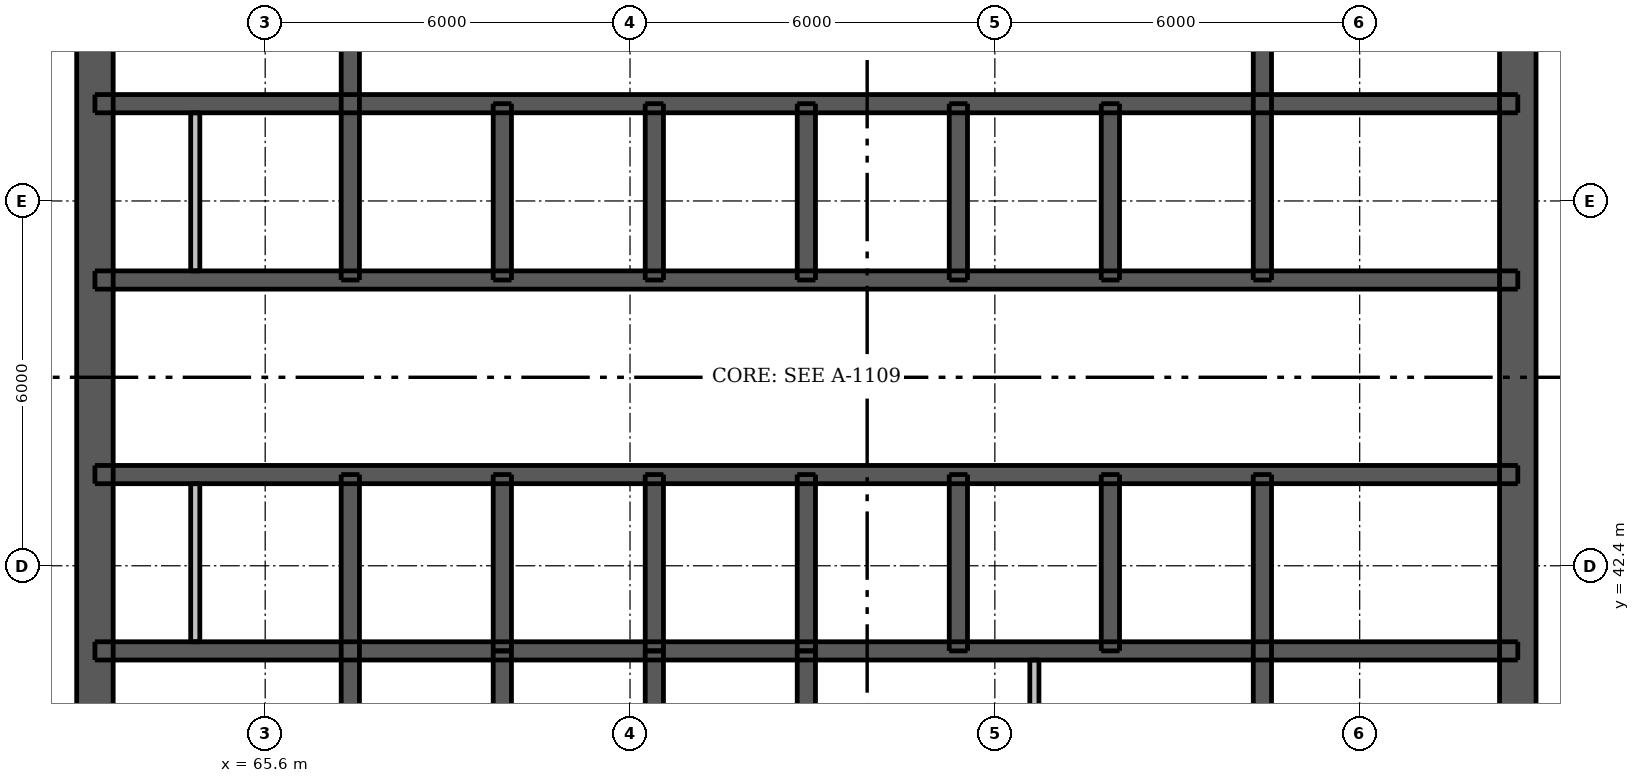
"""IFC4 building model, lengths in metres.
Left out: names, types, materials, properties, quantities, classifications, styles, units other than length and angle.
Written with IfcOpenShell. Run it as: python <this file> out.ifc"""

import sys

from ifc_helpers import new_model, si_unit, direction, frame, frame_2d, origin, place, context, subcontext, project, spatial, rectangle, extrude, element, fill, save


model = new_model("IFC4")
c1 = context("Model", 3, precision=1e-05, world=origin(), true_north=direction((0.0, 1.0)))
c2 = subcontext(c1, "Body", "Model", "MODEL_VIEW")
j1 = project(units=[si_unit("LENGTHUNIT", "METRE"), si_unit("PLANEANGLEUNIT", "RADIAN")], contexts=[c1])
p1 = place(None, origin())
s1 = spatial("IfcSite", under=j1, at=p1, CompositionType="ELEMENT")
p2 = place(p1, origin())
s2 = spatial("IfcBuilding", under=s1, at=p2, CompositionType="ELEMENT")
p3 = place(p2, frame((0.0, 0.0, 193.6)))
s3 = spatial("IfcBuildingStorey", under=s2, at=p3, CompositionType="ELEMENT", Elevation=193.6)
p4 = place(p3, frame((62.8, 33.5, 0.0), z_axis=(0.0, 0.0, 1.0), x_axis=(0.0, 1.0, 0.0)))
e1 = element("IfcWall", 1, at=p4, inside=s3, PredefinedType="SHEAR", context=c2, shape_type="SweptSolid", body=[
    extrude(rectangle(XDim=24.0, YDim=0.6, at=frame_2d((12.0, 0.0))), origin(), (0.0, 0.0, 1.0), 3.05),
])
p5 = place(p4, frame((11.2, 0.0, 0.0)))
e2 = element("IfcOpeningElement", 2, at=p5, cuts=e1, PredefinedType="OPENING", context=c2, shape_type="SweptSolid", body=[
    extrude(rectangle(XDim=1.6, YDim=2.1, at=frame_2d((0.8, 1.05))), frame((0.0, 0.31, 0.0), z_axis=(0.0, -1.0, 0.0), x_axis=(1.0, 0.0, 0.0)), (0.0, 0.0, 1.0), 0.62),
])
p6 = place(p3, frame((86.2, 33.5, 0.0), z_axis=(0.0, 0.0, 1.0), x_axis=(0.0, 1.0, 0.0)))
e3 = element("IfcWall", 3, at=p6, inside=s3, PredefinedType="SHEAR", context=c2, shape_type="SweptSolid", body=[
    extrude(rectangle(XDim=24.0, YDim=0.6, at=frame_2d((12.0, 0.0))), origin(), (0.0, 0.0, 1.0), 3.05),
])
p7 = place(p6, frame((11.2, 0.0, 0.0)))
e4 = element("IfcOpeningElement", 4, at=p7, cuts=e3, PredefinedType="OPENING", context=c2, shape_type="SweptSolid", body=[
    extrude(rectangle(XDim=1.6, YDim=2.1, at=frame_2d((0.8, 1.05))), frame((0.0, 0.31, 0.0), z_axis=(0.0, -1.0, 0.0), x_axis=(1.0, 0.0, 0.0)), (0.0, 0.0, 1.0), 0.62),
])
p8 = place(p3, frame((62.8, 41.0, 0.0), z_axis=(0.0, 0.0, 1.0), x_axis=(1.0, 0.0, 0.0)))
e5 = element("IfcWall", 5, at=p8, inside=s3, PredefinedType="SHEAR", context=c2, shape_type="SweptSolid", body=[
    extrude(rectangle(XDim=23.4, YDim=0.3, at=frame_2d((11.7, 0.0))), origin(), (0.0, 0.0, 1.0), 3.05),
])
p9 = place(p3, frame((62.8, 43.9, 0.0), z_axis=(0.0, 0.0, 1.0), x_axis=(1.0, 0.0, 0.0)))
e6 = element("IfcWall", 6, at=p9, inside=s3, PredefinedType="SHEAR", context=c2, shape_type="SweptSolid", body=[
    extrude(rectangle(XDim=23.4, YDim=0.3, at=frame_2d((11.7, 0.0))), origin(), (0.0, 0.0, 1.0), 3.05),
])
p10 = place(p9, frame((0.575, 0.0, 0.0)))
e7 = element("IfcOpeningElement", 7, at=p10, cuts=e6, PredefinedType="OPENING", context=c2, shape_type="SweptSolid", body=[
    extrude(rectangle(XDim=0.8, YDim=2.1, at=frame_2d((0.4, 1.05))), frame((0.0, 0.16, 0.0), z_axis=(0.0, -1.0, 0.0), x_axis=(1.0, 0.0, 0.0)), (0.0, 0.0, 1.0), 0.32),
])
p11 = place(p9, frame((2.4, 0.0, 0.0)))
e8 = element("IfcOpeningElement", 8, at=p11, cuts=e6, PredefinedType="OPENING", context=c2, shape_type="SweptSolid", body=[
    extrude(rectangle(XDim=0.9, YDim=2.1, at=frame_2d((0.45, 1.05))), frame((0.0, 0.16, 0.0), z_axis=(0.0, -1.0, 0.0), x_axis=(1.0, 0.0, 0.0)), (0.0, 0.0, 1.0), 0.32),
])
p12 = place(p9, frame((20.775, 0.0, 0.0)))
e9 = element("IfcOpeningElement", 9, at=p12, cuts=e6, PredefinedType="OPENING", context=c2, shape_type="SweptSolid", body=[
    extrude(rectangle(XDim=0.9, YDim=2.1, at=frame_2d((0.45, 1.05))), frame((0.0, 0.16, 0.0), z_axis=(0.0, -1.0, 0.0), x_axis=(1.0, 0.0, 0.0)), (0.0, 0.0, 1.0), 0.32),
])
p13 = place(p9, frame((7.5, 0.0, 0.0)))
e10 = element("IfcOpeningElement", 10, at=p13, cuts=e6, PredefinedType="OPENING", context=c2, shape_type="SweptSolid", body=[
    extrude(rectangle(XDim=0.9, YDim=2.1, at=frame_2d((0.45, 1.05))), frame((0.0, 0.16, 0.0), z_axis=(0.0, -1.0, 0.0), x_axis=(1.0, 0.0, 0.0)), (0.0, 0.0, 1.0), 0.32),
])
p14 = place(p9, frame((10.0, 0.0, 0.0)))
e11 = element("IfcOpeningElement", 11, at=p14, cuts=e6, PredefinedType="OPENING", context=c2, shape_type="SweptSolid", body=[
    extrude(rectangle(XDim=0.9, YDim=2.1, at=frame_2d((0.45, 1.05))), frame((0.0, 0.16, 0.0), z_axis=(0.0, -1.0, 0.0), x_axis=(1.0, 0.0, 0.0)), (0.0, 0.0, 1.0), 0.32),
])
p15 = place(p9, frame((15.0, 0.0, 0.0)))
e12 = element("IfcOpeningElement", 12, at=p15, cuts=e6, PredefinedType="OPENING", context=c2, shape_type="SweptSolid", body=[
    extrude(rectangle(XDim=0.9, YDim=2.1, at=frame_2d((0.45, 1.05))), frame((0.0, 0.16, 0.0), z_axis=(0.0, -1.0, 0.0), x_axis=(1.0, 0.0, 0.0)), (0.0, 0.0, 1.0), 0.32),
])
p16 = place(p9, frame((17.5, 0.0, 0.0)))
e13 = element("IfcOpeningElement", 13, at=p16, cuts=e6, PredefinedType="OPENING", context=c2, shape_type="SweptSolid", body=[
    extrude(rectangle(XDim=0.9, YDim=2.1, at=frame_2d((0.45, 1.05))), frame((0.0, 0.16, 0.0), z_axis=(0.0, -1.0, 0.0), x_axis=(1.0, 0.0, 0.0)), (0.0, 0.0, 1.0), 0.32),
])
p17 = place(p3, frame((62.8, 47.1, 0.0), z_axis=(0.0, 0.0, 1.0), x_axis=(1.0, 0.0, 0.0)))
e14 = element("IfcWall", 14, at=p17, inside=s3, PredefinedType="SHEAR", context=c2, shape_type="SweptSolid", body=[
    extrude(rectangle(XDim=23.4, YDim=0.3, at=frame_2d((11.7, 0.0))), origin(), (0.0, 0.0, 1.0), 3.05),
])
p18 = place(p17, frame((0.575, 0.0, 0.0)))
e15 = element("IfcOpeningElement", 15, at=p18, cuts=e14, PredefinedType="OPENING", context=c2, shape_type="SweptSolid", body=[
    extrude(rectangle(XDim=0.8, YDim=2.1, at=frame_2d((0.4, 1.05))), frame((0.0, 0.16, 0.0), z_axis=(0.0, -1.0, 0.0), x_axis=(1.0, 0.0, 0.0)), (0.0, 0.0, 1.0), 0.32),
])
p19 = place(p17, frame((2.4, 0.0, 0.0)))
e16 = element("IfcOpeningElement", 16, at=p19, cuts=e14, PredefinedType="OPENING", context=c2, shape_type="SweptSolid", body=[
    extrude(rectangle(XDim=0.9, YDim=2.1, at=frame_2d((0.45, 1.05))), frame((0.0, 0.16, 0.0), z_axis=(0.0, -1.0, 0.0), x_axis=(1.0, 0.0, 0.0)), (0.0, 0.0, 1.0), 0.32),
])
p20 = place(p17, frame((20.775, 0.0, 0.0)))
e17 = element("IfcOpeningElement", 17, at=p20, cuts=e14, PredefinedType="OPENING", context=c2, shape_type="SweptSolid", body=[
    extrude(rectangle(XDim=0.9, YDim=2.1, at=frame_2d((0.45, 1.05))), frame((0.0, 0.16, 0.0), z_axis=(0.0, -1.0, 0.0), x_axis=(1.0, 0.0, 0.0)), (0.0, 0.0, 1.0), 0.32),
])
p21 = place(p17, frame((4.9, 0.0, 0.0)))
e18 = element("IfcOpeningElement", 18, at=p21, cuts=e14, PredefinedType="OPENING", context=c2, shape_type="SweptSolid", body=[
    extrude(rectangle(XDim=1.1, YDim=2.1, at=frame_2d((0.55, 1.05))), frame((0.0, 0.16, 0.0), z_axis=(0.0, -1.0, 0.0), x_axis=(1.0, 0.0, 0.0)), (0.0, 0.0, 1.0), 0.32),
])
p22 = place(p17, frame((7.4, 0.0, 0.0)))
e19 = element("IfcOpeningElement", 19, at=p22, cuts=e14, PredefinedType="OPENING", context=c2, shape_type="SweptSolid", body=[
    extrude(rectangle(XDim=1.1, YDim=2.1, at=frame_2d((0.55, 1.05))), frame((0.0, 0.16, 0.0), z_axis=(0.0, -1.0, 0.0), x_axis=(1.0, 0.0, 0.0)), (0.0, 0.0, 1.0), 0.32),
])
p23 = place(p17, frame((9.9, 0.0, 0.0)))
e20 = element("IfcOpeningElement", 20, at=p23, cuts=e14, PredefinedType="OPENING", context=c2, shape_type="SweptSolid", body=[
    extrude(rectangle(XDim=1.1, YDim=2.1, at=frame_2d((0.55, 1.05))), frame((0.0, 0.16, 0.0), z_axis=(0.0, -1.0, 0.0), x_axis=(1.0, 0.0, 0.0)), (0.0, 0.0, 1.0), 0.32),
])
p24 = place(p17, frame((12.4, 0.0, 0.0)))
e21 = element("IfcOpeningElement", 21, at=p24, cuts=e14, PredefinedType="OPENING", context=c2, shape_type="SweptSolid", body=[
    extrude(rectangle(XDim=1.1, YDim=2.1, at=frame_2d((0.55, 1.05))), frame((0.0, 0.16, 0.0), z_axis=(0.0, -1.0, 0.0), x_axis=(1.0, 0.0, 0.0)), (0.0, 0.0, 1.0), 0.32),
])
p25 = place(p17, frame((14.9, 0.0, 0.0)))
e22 = element("IfcOpeningElement", 22, at=p25, cuts=e14, PredefinedType="OPENING", context=c2, shape_type="SweptSolid", body=[
    extrude(rectangle(XDim=1.1, YDim=2.1, at=frame_2d((0.55, 1.05))), frame((0.0, 0.16, 0.0), z_axis=(0.0, -1.0, 0.0), x_axis=(1.0, 0.0, 0.0)), (0.0, 0.0, 1.0), 0.32),
])
p26 = place(p17, frame((17.4, 0.0, 0.0)))
e23 = element("IfcOpeningElement", 23, at=p26, cuts=e14, PredefinedType="OPENING", context=c2, shape_type="SweptSolid", body=[
    extrude(rectangle(XDim=1.1, YDim=2.1, at=frame_2d((0.55, 1.05))), frame((0.0, 0.16, 0.0), z_axis=(0.0, -1.0, 0.0), x_axis=(1.0, 0.0, 0.0)), (0.0, 0.0, 1.0), 0.32),
])
p27 = place(p3, frame((62.8, 50.0, 0.0), z_axis=(0.0, 0.0, 1.0), x_axis=(1.0, 0.0, 0.0)))
e24 = element("IfcWall", 24, at=p27, inside=s3, PredefinedType="SHEAR", context=c2, shape_type="SweptSolid", body=[
    extrude(rectangle(XDim=23.4, YDim=0.3, at=frame_2d((11.7, 0.0))), origin(), (0.0, 0.0, 1.0), 3.05),
])
p28 = place(p3, frame((67.0, 33.8, 0.0), z_axis=(0.0, 0.0, 1.0), x_axis=(0.0, 1.0, 0.0)))
e25 = element("IfcWall", 25, at=p28, inside=s3, PredefinedType="SHEAR", context=c2, shape_type="SweptSolid", body=[
    extrude(rectangle(XDim=10.1, YDim=0.3, at=frame_2d((5.05, 0.0))), origin(), (0.0, 0.0, 1.0), 3.05),
])
p29 = place(p28, frame((0.5, 0.0, 0.0)))
e26 = element("IfcOpeningElement", 26, at=p29, cuts=e25, PredefinedType="OPENING", context=c2, shape_type="SweptSolid", body=[
    extrude(rectangle(XDim=1.1, YDim=2.1, at=frame_2d((0.55, 1.05))), frame((0.0, 0.16, 0.0), z_axis=(0.0, -1.0, 0.0), x_axis=(1.0, 0.0, 0.0)), (0.0, 0.0, 1.0), 0.32),
])
for number, where, z_axis, x_axis in (
    (27, (67.0, 47.1, 0.0), (0.0, 0.0, 1.0), (0.0, 1.0, 0.0)),
    (28, (82.0, 33.8, 0.0), (0.0, 0.0, 1.0), (0.0, 1.0, 0.0)),
    (29, (82.0, 47.1, 0.0), (0.0, 0.0, 1.0), (0.0, 1.0, 0.0)),
):
    element("IfcWall", number, at=place(p3, frame(where, z_axis=z_axis, x_axis=x_axis)), inside=s3, PredefinedType="SHEAR", context=c2, shape_type="SweptSolid", body=[
        extrude(rectangle(XDim=10.1, YDim=0.3, at=frame_2d((5.05, 0.0))), origin(), (0.0, 0.0, 1.0), 3.05),
    ])
for number, where, z_axis, x_axis in (
    (30, (69.5, 41.0, 0.0), (0.0, 0.0, 1.0), (0.0, 1.0, 0.0)),
    (31, (69.5, 47.1, 0.0), (0.0, 0.0, 1.0), (0.0, 1.0, 0.0)),
    (32, (72.0, 41.0, 0.0), (0.0, 0.0, 1.0), (0.0, 1.0, 0.0)),
    (33, (72.0, 47.1, 0.0), (0.0, 0.0, 1.0), (0.0, 1.0, 0.0)),
    (34, (74.5, 41.0, 0.0), (0.0, 0.0, 1.0), (0.0, 1.0, 0.0)),
    (35, (74.5, 47.1, 0.0), (0.0, 0.0, 1.0), (0.0, 1.0, 0.0)),
    (36, (77.0, 41.0, 0.0), (0.0, 0.0, 1.0), (0.0, 1.0, 0.0)),
    (37, (77.0, 47.1, 0.0), (0.0, 0.0, 1.0), (0.0, 1.0, 0.0)),
    (38, (79.5, 41.0, 0.0), (0.0, 0.0, 1.0), (0.0, 1.0, 0.0)),
    (39, (79.5, 47.1, 0.0), (0.0, 0.0, 1.0), (0.0, 1.0, 0.0)),
    (40, (69.5, 38.1, 0.0), (0.0, 0.0, 1.0), (0.0, 1.0, 0.0)),
    (41, (72.0, 38.1, 0.0), (0.0, 0.0, 1.0), (0.0, 1.0, 0.0)),
    (42, (74.5, 38.1, 0.0), (0.0, 0.0, 1.0), (0.0, 1.0, 0.0)),
):
    element("IfcWall", number, at=place(p3, frame(where, z_axis=z_axis, x_axis=x_axis)), inside=s3, PredefinedType="SHEAR", context=c2, shape_type="SweptSolid", body=[
        extrude(rectangle(XDim=2.9, YDim=0.3, at=frame_2d((1.45, 0.0))), origin(), (0.0, 0.0, 1.0), 3.05),
    ])
p30 = place(p3, frame((78.25, 34.1, 0.0), z_axis=(0.0, 0.0, 1.0), x_axis=(0.0, 1.0, 0.0)))
e43 = element("IfcWall", 43, at=p30, inside=s3, PredefinedType="PLUMBINGWALL", context=c2, shape_type="SweptSolid", body=[
    extrude(rectangle(XDim=6.75, YDim=0.15, at=frame_2d((3.375, 0.0))), origin(), (0.0, 0.0, 1.0), 3.05),
])
for number, where, z_axis, x_axis in (
    (44, (64.45, 41.15, 0.0), (0.0, 0.0, 1.0), (0.0, 1.0, 0.0)),
    (45, (64.45, 47.25, 0.0), (0.0, 0.0, 1.0), (0.0, 1.0, 0.0)),
):
    element("IfcWall", number, at=place(p3, frame(where, z_axis=z_axis, x_axis=x_axis)), inside=s3, PredefinedType="PLUMBINGWALL", context=c2, shape_type="SweptSolid", body=[
        extrude(rectangle(XDim=2.6, YDim=0.15, at=frame_2d((1.3, 0.0))), origin(), (0.0, 0.0, 1.0), 3.05),
    ])
p31 = place(p5, origin())
e46 = element("IfcDoor", 46, at=p31, inside=s3, OperationType="DOUBLE_DOOR_SINGLE_SWING", PredefinedType="DOOR", context=c2, shape_type="SweptSolid", body=[
    extrude(rectangle(XDim=1.6, YDim=2.1, at=frame_2d((0.8, 1.05))), frame((0.0, -0.237, 0.0), z_axis=(0.0, -1.0, 0.0), x_axis=(1.0, 0.0, 0.0)), (0.0, 0.0, 1.0), 0.05),
])
fill(e2, e46)
p32 = place(p7, origin())
e47 = element("IfcDoor", 47, at=p32, inside=s3, OperationType="DOUBLE_DOOR_SINGLE_SWING", PredefinedType="DOOR", context=c2, shape_type="SweptSolid", body=[
    extrude(rectangle(XDim=1.6, YDim=2.1, at=frame_2d((0.8, 1.05))), frame((0.0, 0.288, 0.0), z_axis=(0.0, -1.0, 0.0), x_axis=(1.0, 0.0, 0.0)), (0.0, 0.0, 1.0), 0.05),
])
fill(e4, e47)
p33 = place(p10, origin())
e48 = element("IfcDoor", 48, at=p33, inside=s3, OperationType="SINGLE_SWING_LEFT", PredefinedType="DOOR", context=c2, shape_type="SweptSolid", body=[
    extrude(rectangle(XDim=0.8, YDim=2.1, at=frame_2d((0.4, 1.05))), frame((0.0, -0.087, 0.0), z_axis=(0.0, -1.0, 0.0), x_axis=(1.0, 0.0, 0.0)), (0.0, 0.0, 1.0), 0.05),
])
fill(e7, e48)
p34 = place(p11, origin())
e49 = element("IfcDoor", 49, at=p34, inside=s3, OperationType="SINGLE_SWING_RIGHT", PredefinedType="DOOR", context=c2, shape_type="SweptSolid", body=[
    extrude(rectangle(XDim=0.9, YDim=2.1, at=frame_2d((0.45, 1.05))), frame((0.0, -0.087, 0.0), z_axis=(0.0, -1.0, 0.0), x_axis=(1.0, 0.0, 0.0)), (0.0, 0.0, 1.0), 0.05),
])
fill(e8, e49)
p35 = place(p12, origin())
e50 = element("IfcDoor", 50, at=p35, inside=s3, OperationType="SINGLE_SWING_LEFT", PredefinedType="DOOR", context=c2, shape_type="SweptSolid", body=[
    extrude(rectangle(XDim=0.9, YDim=2.1, at=frame_2d((0.45, 1.05))), frame((0.0, -0.087, 0.0), z_axis=(0.0, -1.0, 0.0), x_axis=(1.0, 0.0, 0.0)), (0.0, 0.0, 1.0), 0.05),
])
fill(e9, e50)
p36 = place(p18, origin())
e51 = element("IfcDoor", 51, at=p36, inside=s3, OperationType="SINGLE_SWING_LEFT", PredefinedType="DOOR", context=c2, shape_type="SweptSolid", body=[
    extrude(rectangle(XDim=0.8, YDim=2.1, at=frame_2d((0.4, 1.05))), frame((0.0, 0.138, 0.0), z_axis=(0.0, -1.0, 0.0), x_axis=(1.0, 0.0, 0.0)), (0.0, 0.0, 1.0), 0.05),
])
fill(e15, e51)
p37 = place(p19, origin())
e52 = element("IfcDoor", 52, at=p37, inside=s3, OperationType="SINGLE_SWING_RIGHT", PredefinedType="DOOR", context=c2, shape_type="SweptSolid", body=[
    extrude(rectangle(XDim=0.9, YDim=2.1, at=frame_2d((0.45, 1.05))), frame((0.0, 0.138, 0.0), z_axis=(0.0, -1.0, 0.0), x_axis=(1.0, 0.0, 0.0)), (0.0, 0.0, 1.0), 0.05),
])
fill(e16, e52)
p38 = place(p20, origin())
e53 = element("IfcDoor", 53, at=p38, inside=s3, OperationType="SINGLE_SWING_LEFT", PredefinedType="DOOR", context=c2, shape_type="SweptSolid", body=[
    extrude(rectangle(XDim=0.9, YDim=2.1, at=frame_2d((0.45, 1.05))), frame((0.0, 0.138, 0.0), z_axis=(0.0, -1.0, 0.0), x_axis=(1.0, 0.0, 0.0)), (0.0, 0.0, 1.0), 0.05),
])
fill(e17, e53)
p39 = place(p13, origin())
e54 = element("IfcDoor", 54, at=p39, inside=s3, OperationType="SINGLE_SWING_LEFT", PredefinedType="DOOR", context=c2, shape_type="SweptSolid", body=[
    extrude(rectangle(XDim=0.9, YDim=2.1, at=frame_2d((0.45, 1.05))), frame((0.0, -0.087, 0.0), z_axis=(0.0, -1.0, 0.0), x_axis=(1.0, 0.0, 0.0)), (0.0, 0.0, 1.0), 0.05),
])
fill(e10, e54)
p40 = place(p14, origin())
e55 = element("IfcDoor", 55, at=p40, inside=s3, OperationType="SINGLE_SWING_RIGHT", PredefinedType="DOOR", context=c2, shape_type="SweptSolid", body=[
    extrude(rectangle(XDim=0.9, YDim=2.1, at=frame_2d((0.45, 1.05))), frame((0.0, -0.087, 0.0), z_axis=(0.0, -1.0, 0.0), x_axis=(1.0, 0.0, 0.0)), (0.0, 0.0, 1.0), 0.05),
])
fill(e11, e55)
p41 = place(p15, origin())
e56 = element("IfcDoor", 56, at=p41, inside=s3, OperationType="SINGLE_SWING_RIGHT", PredefinedType="DOOR", context=c2, shape_type="SweptSolid", body=[
    extrude(rectangle(XDim=0.9, YDim=2.1, at=frame_2d((0.45, 1.05))), frame((0.0, -0.087, 0.0), z_axis=(0.0, -1.0, 0.0), x_axis=(1.0, 0.0, 0.0)), (0.0, 0.0, 1.0), 0.05),
])
fill(e12, e56)
p42 = place(p16, origin())
e57 = element("IfcDoor", 57, at=p42, inside=s3, OperationType="SINGLE_SWING_LEFT", PredefinedType="DOOR", context=c2, shape_type="SweptSolid", body=[
    extrude(rectangle(XDim=0.9, YDim=2.1, at=frame_2d((0.45, 1.05))), frame((0.0, -0.087, 0.0), z_axis=(0.0, -1.0, 0.0), x_axis=(1.0, 0.0, 0.0)), (0.0, 0.0, 1.0), 0.05),
])
fill(e13, e57)
p43 = place(p21, origin())
e58 = element("IfcDoor", 58, at=p43, inside=s3, OperationType="DOUBLE_DOOR_SLIDING", PredefinedType="DOOR", context=c2, shape_type="SweptSolid", body=[
    extrude(rectangle(XDim=1.1, YDim=2.1, at=frame_2d((0.55, 1.05))), frame((0.0, 0.025, 0.0), z_axis=(0.0, -1.0, 0.0), x_axis=(1.0, 0.0, 0.0)), (0.0, 0.0, 1.0), 0.05),
])
fill(e18, e58)
p44 = place(p22, origin())
e59 = element("IfcDoor", 59, at=p44, inside=s3, OperationType="DOUBLE_DOOR_SLIDING", PredefinedType="DOOR", context=c2, shape_type="SweptSolid", body=[
    extrude(rectangle(XDim=1.1, YDim=2.1, at=frame_2d((0.55, 1.05))), frame((0.0, 0.025, 0.0), z_axis=(0.0, -1.0, 0.0), x_axis=(1.0, 0.0, 0.0)), (0.0, 0.0, 1.0), 0.05),
])
fill(e19, e59)
p45 = place(p23, origin())
e60 = element("IfcDoor", 60, at=p45, inside=s3, OperationType="DOUBLE_DOOR_SLIDING", PredefinedType="DOOR", context=c2, shape_type="SweptSolid", body=[
    extrude(rectangle(XDim=1.1, YDim=2.1, at=frame_2d((0.55, 1.05))), frame((0.0, 0.025, 0.0), z_axis=(0.0, -1.0, 0.0), x_axis=(1.0, 0.0, 0.0)), (0.0, 0.0, 1.0), 0.05),
])
fill(e20, e60)
p46 = place(p24, origin())
e61 = element("IfcDoor", 61, at=p46, inside=s3, OperationType="DOUBLE_DOOR_SLIDING", PredefinedType="DOOR", context=c2, shape_type="SweptSolid", body=[
    extrude(rectangle(XDim=1.1, YDim=2.1, at=frame_2d((0.55, 1.05))), frame((0.0, 0.025, 0.0), z_axis=(0.0, -1.0, 0.0), x_axis=(1.0, 0.0, 0.0)), (0.0, 0.0, 1.0), 0.05),
])
fill(e21, e61)
p47 = place(p25, origin())
e62 = element("IfcDoor", 62, at=p47, inside=s3, OperationType="DOUBLE_DOOR_SLIDING", PredefinedType="DOOR", context=c2, shape_type="SweptSolid", body=[
    extrude(rectangle(XDim=1.1, YDim=2.1, at=frame_2d((0.55, 1.05))), frame((0.0, 0.025, 0.0), z_axis=(0.0, -1.0, 0.0), x_axis=(1.0, 0.0, 0.0)), (0.0, 0.0, 1.0), 0.05),
])
fill(e22, e62)
p48 = place(p26, origin())
e63 = element("IfcDoor", 63, at=p48, inside=s3, OperationType="DOUBLE_DOOR_SLIDING", PredefinedType="DOOR", context=c2, shape_type="SweptSolid", body=[
    extrude(rectangle(XDim=1.1, YDim=2.1, at=frame_2d((0.55, 1.05))), frame((0.0, 0.025, 0.0), z_axis=(0.0, -1.0, 0.0), x_axis=(1.0, 0.0, 0.0)), (0.0, 0.0, 1.0), 0.05),
])
fill(e23, e63)
save(model, sys.argv[1])
